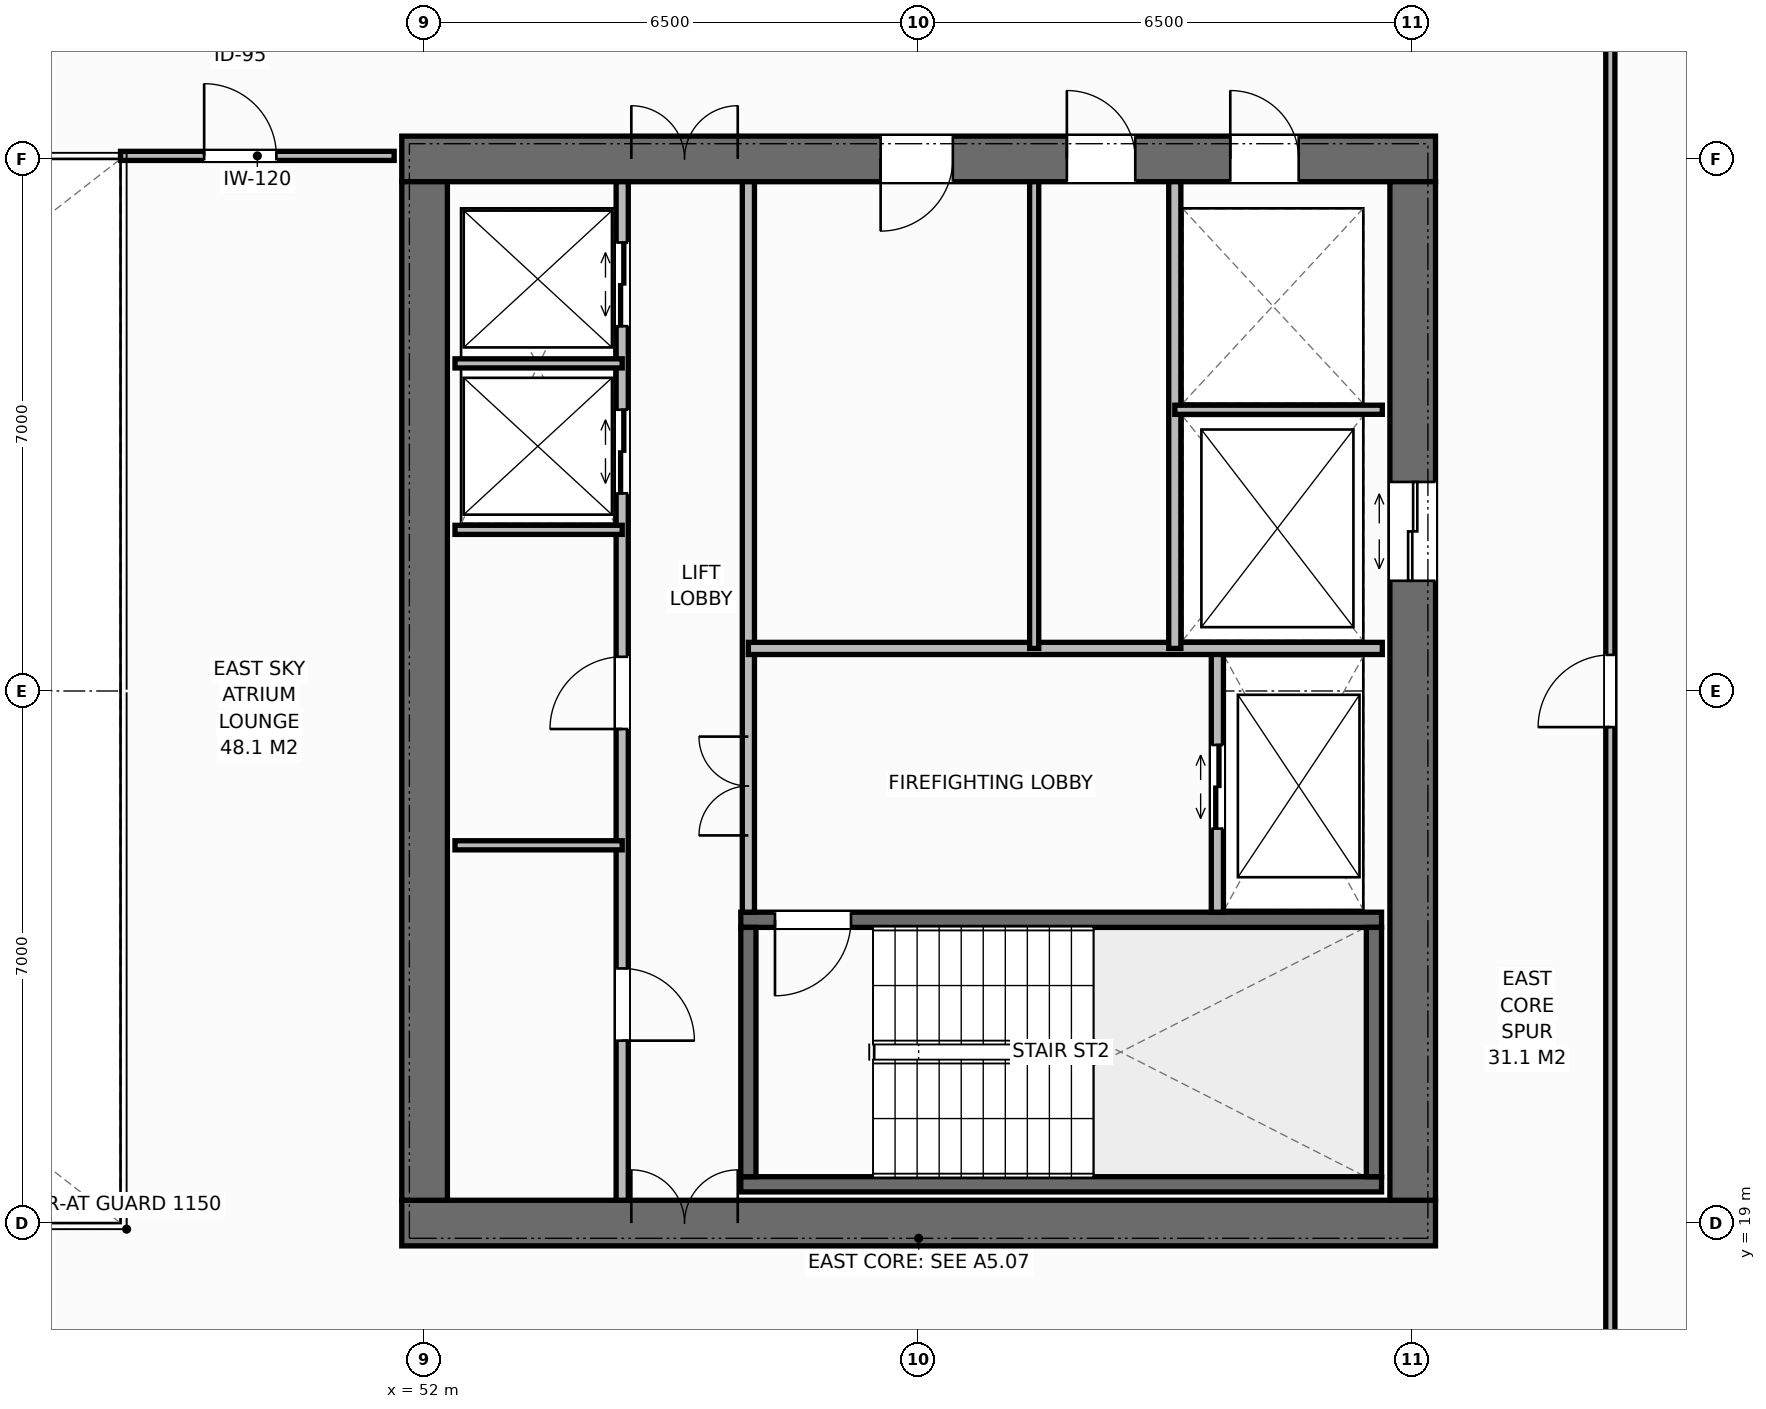
"""IFC4 building model, lengths in metres.
Left out: names, types, materials, properties, quantities, classifications, styles, units other than length and angle.
Written with IfcOpenShell. Run it as: python <this file> out.ifc"""

import sys

from ifc_helpers import new_model, si_unit, direction, frame, frame_2d, origin, place, context, subcontext, project, spatial, rectangle, extrude, element, fill, save


model = new_model("IFC4")
c1 = context("Model", 3, precision=1e-05, world=origin(), true_north=direction((0.0, 1.0)))
c2 = subcontext(c1, "Body", "Model", "MODEL_VIEW")
j1 = project(units=[si_unit("LENGTHUNIT", "METRE"), si_unit("PLANEANGLEUNIT", "RADIAN")], contexts=[c1])
p1 = place(None, origin())
s1 = spatial("IfcSite", under=j1, at=p1, CompositionType="ELEMENT")
p2 = place(p1, origin())
s2 = spatial("IfcBuilding", under=s1, at=p2, CompositionType="ELEMENT")
p3 = place(p2, frame((0.0, 0.0, 151.8)))
s3 = spatial("IfcBuildingStorey", under=s2, at=p3, CompositionType="ELEMENT", Elevation=151.8)
p4 = place(p3, frame((51.7, 19.0, 0.0), z_axis=(0.0, 0.0, 1.0), x_axis=(1.0, 0.0, 0.0)))
e1 = element("IfcWall", 1, at=p4, inside=s3, PredefinedType="SHEAR", context=c2, shape_type="SweptSolid", body=[
    extrude(rectangle(XDim=13.6, YDim=0.6, at=frame_2d((6.8, 0.0))), origin(), (0.0, 0.0, 1.0), 3.8),
])
p5 = place(p4, frame((3.02, 0.0, 0.0)))
e2 = element("IfcOpeningElement", 2, at=p5, cuts=e1, PredefinedType="OPENING", context=c2, shape_type="SweptSolid", body=[
    extrude(rectangle(XDim=1.4, YDim=2.2, at=frame_2d((0.7, 1.1))), frame((0.0, 0.31, 0.0), z_axis=(0.0, -1.0, 0.0), x_axis=(1.0, 0.0, 0.0)), (0.0, 0.0, 1.0), 0.62),
])
p6 = place(p3, frame((51.7, 33.0, 0.0), z_axis=(0.0, 0.0, 1.0), x_axis=(1.0, 0.0, 0.0)))
e3 = element("IfcWall", 3, at=p6, inside=s3, PredefinedType="SHEAR", context=c2, shape_type="SweptSolid", body=[
    extrude(rectangle(XDim=13.6, YDim=0.6, at=frame_2d((6.8, 0.0))), origin(), (0.0, 0.0, 1.0), 3.8),
])
p7 = place(p6, frame((3.02, 0.0, 0.0)))
e4 = element("IfcOpeningElement", 4, at=p7, cuts=e3, PredefinedType="OPENING", context=c2, shape_type="SweptSolid", body=[
    extrude(rectangle(XDim=1.4, YDim=2.2, at=frame_2d((0.7, 1.1))), frame((0.0, 0.31, 0.0), z_axis=(0.0, -1.0, 0.0), x_axis=(1.0, 0.0, 0.0)), (0.0, 0.0, 1.0), 0.62),
])
p8 = place(p6, frame((10.9, 0.0, 0.0)))
e5 = element("IfcOpeningElement", 5, at=p8, cuts=e3, PredefinedType="OPENING", context=c2, shape_type="SweptSolid", body=[
    extrude(rectangle(XDim=0.9, YDim=2.15, at=frame_2d((0.45, 1.075))), frame((0.0, 0.31, 0.0), z_axis=(0.0, -1.0, 0.0), x_axis=(1.0, 0.0, 0.0)), (0.0, 0.0, 1.0), 0.62),
])
p9 = place(p6, frame((6.3, 0.0, 0.0)))
e6 = element("IfcOpeningElement", 6, at=p9, cuts=e3, PredefinedType="OPENING", context=c2, shape_type="SweptSolid", body=[
    extrude(rectangle(XDim=0.95, YDim=2.15, at=frame_2d((0.475, 1.075))), frame((0.0, 0.31, 0.0), z_axis=(0.0, -1.0, 0.0), x_axis=(1.0, 0.0, 0.0)), (0.0, 0.0, 1.0), 0.62),
])
p10 = place(p6, frame((8.75, 0.0, 0.0)))
e7 = element("IfcOpeningElement", 7, at=p10, cuts=e3, PredefinedType="OPENING", context=c2, shape_type="SweptSolid", body=[
    extrude(rectangle(XDim=0.9, YDim=2.15, at=frame_2d((0.45, 1.075))), frame((0.0, 0.31, 0.0), z_axis=(0.0, -1.0, 0.0), x_axis=(1.0, 0.0, 0.0)), (0.0, 0.0, 1.0), 0.62),
])
p11 = place(p3, frame((52.0, 19.3, 0.0), z_axis=(0.0, 0.0, 1.0), x_axis=(0.0, 1.0, 0.0)))
e8 = element("IfcWall", 8, at=p11, inside=s3, PredefinedType="SHEAR", context=c2, shape_type="SweptSolid", body=[
    extrude(rectangle(XDim=13.4, YDim=0.6, at=frame_2d((6.7, 0.0))), origin(), (0.0, 0.0, 1.0), 3.8),
])
p12 = place(p3, frame((65.0, 19.3, 0.0), z_axis=(0.0, 0.0, 1.0), x_axis=(0.0, 1.0, 0.0)))
e9 = element("IfcWall", 9, at=p12, inside=s3, PredefinedType="SHEAR", context=c2, shape_type="SweptSolid", body=[
    extrude(rectangle(XDim=13.4, YDim=0.6, at=frame_2d((6.7, 0.0))), origin(), (0.0, 0.0, 1.0), 3.8),
])
p13 = place(p12, frame((8.15, 0.0, 0.0)))
e10 = element("IfcOpeningElement", 10, at=p13, cuts=e9, PredefinedType="OPENING", context=c2, shape_type="SweptSolid", body=[
    extrude(rectangle(XDim=1.3, YDim=2.2, at=frame_2d((0.65, 1.1))), frame((0.0, 0.31, 0.0), z_axis=(0.0, -1.0, 0.0), x_axis=(1.0, 0.0, 0.0)), (0.0, 0.0, 1.0), 0.62),
])
p14 = place(p3, frame((56.16, 19.51, 0.0), z_axis=(0.0, 0.0, 1.0), x_axis=(1.0, 0.0, 0.0)))
e11 = element("IfcWall", 11, at=p14, inside=s3, PredefinedType="SHEAR", context=c2, shape_type="SweptSolid", body=[
    extrude(rectangle(XDim=8.43, YDim=0.2, at=frame_2d((4.215, 0.0))), origin(), (0.0, 0.0, 1.0), 3.8),
])
p15 = place(p3, frame((56.16, 22.99, 0.0), z_axis=(0.0, 0.0, 1.0), x_axis=(1.0, 0.0, 0.0)))
e12 = element("IfcWall", 12, at=p15, inside=s3, PredefinedType="SHEAR", context=c2, shape_type="SweptSolid", body=[
    extrude(rectangle(XDim=8.43, YDim=0.2, at=frame_2d((4.215, 0.0))), origin(), (0.0, 0.0, 1.0), 3.8),
])
p16 = place(p15, frame((0.45, 0.0, 0.0)))
e13 = element("IfcOpeningElement", 13, at=p16, cuts=e12, PredefinedType="OPENING", context=c2, shape_type="SweptSolid", body=[
    extrude(rectangle(XDim=1.0, YDim=2.15, at=frame_2d((0.5, 1.075))), frame((0.0, 0.11, 0.0), z_axis=(0.0, -1.0, 0.0), x_axis=(1.0, 0.0, 0.0)), (0.0, 0.0, 1.0), 0.22),
])
for number, where, z_axis, x_axis in (
    (14, (56.26, 19.61, 0.0), (0.0, 0.0, 1.0), (0.0, 1.0, 0.0)),
    (15, (64.49, 19.61, 0.0), (0.0, 0.0, 1.0), (0.0, 1.0, 0.0)),
):
    element("IfcWall", number, at=place(p3, frame(where, z_axis=z_axis, x_axis=x_axis)), inside=s3, PredefinedType="SHEAR", context=c2, shape_type="SweptSolid", body=[
        extrude(rectangle(XDim=3.28, YDim=0.2, at=frame_2d((1.64, 0.0))), origin(), (0.0, 0.0, 1.0), 3.8),
    ])
p17 = place(p3, frame((54.6, 19.3, 0.0), z_axis=(0.0, 0.0, 1.0), x_axis=(0.0, 1.0, 0.0)))
e16 = element("IfcWall", 16, at=p17, inside=s3, PredefinedType="STANDARD", context=c2, shape_type="SweptSolid", body=[
    extrude(rectangle(XDim=13.4, YDim=0.16, at=frame_2d((6.7, 0.0))), origin(), (0.0, 0.0, 1.0), 3.572),
])
p18 = place(p17, frame((2.1, 0.0, 0.0)))
e17 = element("IfcOpeningElement", 17, at=p18, cuts=e16, PredefinedType="OPENING", context=c2, shape_type="SweptSolid", body=[
    extrude(rectangle(XDim=0.95, YDim=2.15, at=frame_2d((0.475, 1.075))), frame((0.0, 0.09, 0.0), z_axis=(0.0, -1.0, 0.0), x_axis=(1.0, 0.0, 0.0)), (0.0, 0.0, 1.0), 0.18),
])
p19 = place(p17, frame((6.2, 0.0, 0.0)))
e18 = element("IfcOpeningElement", 18, at=p19, cuts=e16, PredefinedType="OPENING", context=c2, shape_type="SweptSolid", body=[
    extrude(rectangle(XDim=0.95, YDim=2.15, at=frame_2d((0.475, 1.075))), frame((0.0, 0.09, 0.0), z_axis=(0.0, -1.0, 0.0), x_axis=(1.0, 0.0, 0.0)), (0.0, 0.0, 1.0), 0.18),
])
p20 = place(p17, frame((9.3, 0.0, 0.0)))
e19 = element("IfcOpeningElement", 19, at=p20, cuts=e16, PredefinedType="OPENING", context=c2, shape_type="SweptSolid", body=[
    extrude(rectangle(XDim=1.1, YDim=2.2, at=frame_2d((0.55, 1.1))), frame((0.0, 0.09, 0.0), z_axis=(0.0, -1.0, 0.0), x_axis=(1.0, 0.0, 0.0)), (0.0, 0.0, 1.0), 0.18),
])
p21 = place(p17, frame((11.5, 0.0, 0.0)))
e20 = element("IfcOpeningElement", 20, at=p21, cuts=e16, PredefinedType="OPENING", context=c2, shape_type="SweptSolid", body=[
    extrude(rectangle(XDim=1.1, YDim=2.2, at=frame_2d((0.55, 1.1))), frame((0.0, 0.09, 0.0), z_axis=(0.0, -1.0, 0.0), x_axis=(1.0, 0.0, 0.0)), (0.0, 0.0, 1.0), 0.18),
])
p22 = place(p3, frame((56.26, 23.09, 0.0), z_axis=(0.0, 0.0, 1.0), x_axis=(0.0, 1.0, 0.0)))
e21 = element("IfcWall", 21, at=p22, inside=s3, PredefinedType="STANDARD", context=c2, shape_type="SweptSolid", body=[
    extrude(rectangle(XDim=9.61, YDim=0.16, at=frame_2d((4.805, 0.0))), origin(), (0.0, 0.0, 1.0), 3.572),
])
p23 = place(p22, frame((1.01, 0.0, 0.0)))
e22 = element("IfcOpeningElement", 22, at=p23, cuts=e21, PredefinedType="OPENING", context=c2, shape_type="SweptSolid", body=[
    extrude(rectangle(XDim=1.3, YDim=2.2, at=frame_2d((0.65, 1.1))), frame((0.0, 0.09, 0.0), z_axis=(0.0, -1.0, 0.0), x_axis=(1.0, 0.0, 0.0)), (0.0, 0.0, 1.0), 0.18),
])
for number, where, z_axis, x_axis in (
    (23, (52.4, 23.97, 0.0), (0.0, 0.0, 1.0), (1.0, 0.0, 0.0)),
    (24, (52.4, 28.12, 0.0), (0.0, 0.0, 1.0), (1.0, 0.0, 0.0)),
    (25, (52.4, 30.31, 0.0), (0.0, 0.0, 1.0), (1.0, 0.0, 0.0)),
):
    element("IfcWall", number, at=place(p3, frame(where, z_axis=z_axis, x_axis=x_axis)), inside=s3, PredefinedType="PARTITIONING", context=c2, shape_type="SweptSolid", body=[
        extrude(rectangle(XDim=2.2, YDim=0.12, at=frame_2d((1.1, 0.0))), origin(), (0.0, 0.0, 1.0), 3.572),
    ])
p24 = place(p3, frame((62.43, 23.09, 0.0), z_axis=(0.0, 0.0, 1.0), x_axis=(0.0, 1.0, 0.0)))
e26 = element("IfcWall", 26, at=p24, inside=s3, PredefinedType="STANDARD", context=c2, shape_type="SweptSolid", body=[
    extrude(rectangle(XDim=3.47, YDim=0.16, at=frame_2d((1.735, 0.0))), origin(), (0.0, 0.0, 1.0), 3.572),
])
p25 = place(p24, frame((1.1, 0.0, 0.0)))
e27 = element("IfcOpeningElement", 27, at=p25, cuts=e26, PredefinedType="OPENING", context=c2, shape_type="SweptSolid", body=[
    extrude(rectangle(XDim=1.1, YDim=2.2, at=frame_2d((0.55, 1.1))), frame((0.0, 0.09, 0.0), z_axis=(0.0, -1.0, 0.0), x_axis=(1.0, 0.0, 0.0)), (0.0, 0.0, 1.0), 0.18),
])
p26 = place(p3, frame((56.26, 26.56, 0.0), z_axis=(0.0, 0.0, 1.0), x_axis=(1.0, 0.0, 0.0)))
e28 = element("IfcWall", 28, at=p26, inside=s3, PredefinedType="STANDARD", context=c2, shape_type="SweptSolid", body=[
    extrude(rectangle(XDim=8.34, YDim=0.16, at=frame_2d((4.17, 0.0))), origin(), (0.0, 0.0, 1.0), 3.572),
])
p27 = place(p3, frame((61.87, 26.56, 0.0), z_axis=(0.0, 0.0, 1.0), x_axis=(0.0, 1.0, 0.0)))
e29 = element("IfcWall", 29, at=p27, inside=s3, PredefinedType="STANDARD", context=c2, shape_type="SweptSolid", body=[
    extrude(rectangle(XDim=6.14, YDim=0.16, at=frame_2d((3.07, 0.0))), origin(), (0.0, 0.0, 1.0), 3.572),
])
p28 = place(p3, frame((61.87, 29.7, 0.0), z_axis=(0.0, 0.0, 1.0), x_axis=(1.0, 0.0, 0.0)))
e30 = element("IfcWall", 30, at=p28, inside=s3, PredefinedType="PARTITIONING", context=c2, shape_type="SweptSolid", body=[
    extrude(rectangle(XDim=2.73, YDim=0.12, at=frame_2d((1.365, 0.0))), origin(), (0.0, 0.0, 1.0), 3.572),
])
p29 = place(p3, frame((60.02, 26.56, 0.0), z_axis=(0.0, 0.0, 1.0), x_axis=(0.0, 1.0, 0.0)))
e31 = element("IfcWall", 31, at=p29, inside=s3, PredefinedType="PARTITIONING", context=c2, shape_type="SweptSolid", body=[
    extrude(rectangle(XDim=6.14, YDim=0.12, at=frame_2d((3.07, 0.0))), origin(), (0.0, 0.0, 1.0), 3.572),
])
p30 = place(p3, frame((48.0, 33.04, 0.0), z_axis=(0.0, 0.0, 1.0), x_axis=(1.0, 0.0, 0.0)))
e32 = element("IfcWall", 32, at=p30, inside=s3, PredefinedType="PARTITIONING", context=c2, shape_type="SweptSolid", body=[
    extrude(rectangle(XDim=3.6, YDim=0.12, at=frame_2d((1.8, 0.0))), origin(), (0.0, 0.0, 1.0), 3.312),
])
p31 = place(p30, frame((1.1, 0.0, 0.0)))
e33 = element("IfcOpeningElement", 33, at=p31, cuts=e32, PredefinedType="OPENING", context=c2, shape_type="SweptSolid", body=[
    extrude(rectangle(XDim=0.95, YDim=2.15, at=frame_2d((0.475, 1.075))), frame((0.0, 0.07, 0.0), z_axis=(0.0, -1.0, 0.0), x_axis=(1.0, 0.0, 0.0)), (0.0, 0.0, 1.0), 0.14),
])
p32 = place(p3, frame((67.6, 16.5, 0.0), z_axis=(0.0, 0.0, 1.0), x_axis=(0.0, 1.0, 0.0)))
e34 = element("IfcWall", 34, at=p32, inside=s3, PredefinedType="PARTITIONING", context=c2, shape_type="SweptSolid", body=[
    extrude(rectangle(XDim=19.0, YDim=0.12, at=frame_2d((9.5, 0.0))), origin(), (0.0, 0.0, 1.0), 3.572),
])
p33 = place(p32, frame((9.025, 0.0, 0.0)))
e35 = element("IfcOpeningElement", 35, at=p33, cuts=e34, PredefinedType="OPENING", context=c2, shape_type="SweptSolid", body=[
    extrude(rectangle(XDim=0.95, YDim=2.15, at=frame_2d((0.475, 1.075))), frame((0.0, 0.07, 0.0), z_axis=(0.0, -1.0, 0.0), x_axis=(1.0, 0.0, 0.0)), (0.0, 0.0, 1.0), 0.14),
])
p34 = place(p5, origin())
e36 = element("IfcDoor", 36, at=p34, inside=s3, OperationType="DOUBLE_DOOR_SINGLE_SWING", PredefinedType="DOOR", context=c2, shape_type="SweptSolid", body=[
    extrude(rectangle(XDim=1.4, YDim=2.2, at=frame_2d((0.7, 1.1))), frame((0.0, 0.075, 0.0), z_axis=(0.0, -1.0, 0.0), x_axis=(1.0, 0.0, 0.0)), (0.0, 0.0, 1.0), 0.05),
])
fill(e2, e36)
p35 = place(p7, origin())
e37 = element("IfcDoor", 37, at=p35, inside=s3, OperationType="DOUBLE_DOOR_SINGLE_SWING", PredefinedType="DOOR", context=c2, shape_type="SweptSolid", body=[
    extrude(rectangle(XDim=1.4, YDim=2.2, at=frame_2d((0.7, 1.1))), frame((0.0, -0.025, 0.0), z_axis=(0.0, -1.0, 0.0), x_axis=(1.0, 0.0, 0.0)), (0.0, 0.0, 1.0), 0.05),
])
fill(e4, e37)
p36 = place(p18, origin())
e38 = element("IfcDoor", 38, at=p36, inside=s3, OperationType="SINGLE_SWING_RIGHT", PredefinedType="DOOR", context=c2, shape_type="SweptSolid", body=[
    extrude(rectangle(XDim=0.95, YDim=2.15, at=frame_2d((0.475, 1.075))), frame((0.0, 0.025, 0.0), z_axis=(0.0, -1.0, 0.0), x_axis=(1.0, 0.0, 0.0)), (0.0, 0.0, 1.0), 0.05),
])
fill(e17, e38)
p37 = place(p19, origin())
e39 = element("IfcDoor", 39, at=p37, inside=s3, OperationType="SINGLE_SWING_LEFT", PredefinedType="DOOR", context=c2, shape_type="SweptSolid", body=[
    extrude(rectangle(XDim=0.95, YDim=2.15, at=frame_2d((0.475, 1.075))), frame((0.0, 0.025, 0.0), z_axis=(0.0, -1.0, 0.0), x_axis=(1.0, 0.0, 0.0)), (0.0, 0.0, 1.0), 0.05),
])
fill(e18, e39)
p38 = place(p20, origin())
e40 = element("IfcDoor", 40, at=p38, inside=s3, OperationType="DOUBLE_DOOR_SLIDING", PredefinedType="DOOR", context=c2, shape_type="SweptSolid", body=[
    extrude(rectangle(XDim=1.1, YDim=2.2, at=frame_2d((0.55, 1.1))), frame((0.0, 0.025, 0.0), z_axis=(0.0, -1.0, 0.0), x_axis=(1.0, 0.0, 0.0)), (0.0, 0.0, 1.0), 0.05),
])
fill(e19, e40)
p39 = place(p21, origin())
e41 = element("IfcDoor", 41, at=p39, inside=s3, OperationType="DOUBLE_DOOR_SLIDING", PredefinedType="DOOR", context=c2, shape_type="SweptSolid", body=[
    extrude(rectangle(XDim=1.1, YDim=2.2, at=frame_2d((0.55, 1.1))), frame((0.0, 0.025, 0.0), z_axis=(0.0, -1.0, 0.0), x_axis=(1.0, 0.0, 0.0)), (0.0, 0.0, 1.0), 0.05),
])
fill(e20, e41)
p40 = place(p16, origin())
e42 = element("IfcDoor", 42, at=p40, inside=s3, OperationType="SINGLE_SWING_RIGHT", PredefinedType="DOOR", context=c2, shape_type="SweptSolid", body=[
    extrude(rectangle(XDim=1.0, YDim=2.15, at=frame_2d((0.5, 1.075))), frame((0.0, 0.025, 0.0), z_axis=(0.0, -1.0, 0.0), x_axis=(1.0, 0.0, 0.0)), (0.0, 0.0, 1.0), 0.05),
])
fill(e13, e42)
p41 = place(p25, origin())
e43 = element("IfcDoor", 43, at=p41, inside=s3, OperationType="DOUBLE_DOOR_SLIDING", PredefinedType="DOOR", context=c2, shape_type="SweptSolid", body=[
    extrude(rectangle(XDim=1.1, YDim=2.2, at=frame_2d((0.55, 1.1))), frame((0.0, 0.025, 0.0), z_axis=(0.0, -1.0, 0.0), x_axis=(1.0, 0.0, 0.0)), (0.0, 0.0, 1.0), 0.05),
])
fill(e27, e43)
p42 = place(p23, origin())
e44 = element("IfcDoor", 44, at=p42, inside=s3, OperationType="DOUBLE_DOOR_SINGLE_SWING", PredefinedType="DOOR", context=c2, shape_type="SweptSolid", body=[
    extrude(rectangle(XDim=1.3, YDim=2.2, at=frame_2d((0.65, 1.1))), frame((0.0, 0.025, 0.0), z_axis=(0.0, -1.0, 0.0), x_axis=(1.0, 0.0, 0.0)), (0.0, 0.0, 1.0), 0.05),
])
fill(e22, e44)
p43 = place(p13, origin())
e45 = element("IfcDoor", 45, at=p43, inside=s3, OperationType="DOUBLE_DOOR_SLIDING", PredefinedType="DOOR", context=c2, shape_type="SweptSolid", body=[
    extrude(rectangle(XDim=1.3, YDim=2.2, at=frame_2d((0.65, 1.1))), frame((0.0, 0.025, 0.0), z_axis=(0.0, -1.0, 0.0), x_axis=(1.0, 0.0, 0.0)), (0.0, 0.0, 1.0), 0.05),
])
fill(e10, e45)
p44 = place(p8, origin())
e46 = element("IfcDoor", 46, at=p44, inside=s3, OperationType="SINGLE_SWING_LEFT", PredefinedType="DOOR", context=c2, shape_type="SweptSolid", body=[
    extrude(rectangle(XDim=0.9, YDim=2.15, at=frame_2d((0.45, 1.075))), frame((0.0, -0.025, 0.0), z_axis=(0.0, -1.0, 0.0), x_axis=(1.0, 0.0, 0.0)), (0.0, 0.0, 1.0), 0.05),
])
fill(e5, e46)
p45 = place(p9, origin())
e47 = element("IfcDoor", 47, at=p45, inside=s3, OperationType="SINGLE_SWING_RIGHT", PredefinedType="DOOR", context=c2, shape_type="SweptSolid", body=[
    extrude(rectangle(XDim=0.95, YDim=2.15, at=frame_2d((0.475, 1.075))), frame((0.0, -0.025, 0.0), z_axis=(0.0, -1.0, 0.0), x_axis=(1.0, 0.0, 0.0)), (0.0, 0.0, 1.0), 0.05),
])
fill(e6, e47)
p46 = place(p10, origin())
e48 = element("IfcDoor", 48, at=p46, inside=s3, OperationType="SINGLE_SWING_LEFT", PredefinedType="DOOR", context=c2, shape_type="SweptSolid", body=[
    extrude(rectangle(XDim=0.9, YDim=2.15, at=frame_2d((0.45, 1.075))), frame((0.0, -0.025, 0.0), z_axis=(0.0, -1.0, 0.0), x_axis=(1.0, 0.0, 0.0)), (0.0, 0.0, 1.0), 0.05),
])
fill(e7, e48)
p47 = place(p31, origin())
e49 = element("IfcDoor", 49, at=p47, inside=s3, OperationType="SINGLE_SWING_LEFT", PredefinedType="DOOR", context=c2, shape_type="SweptSolid", body=[
    extrude(rectangle(XDim=0.95, YDim=2.15, at=frame_2d((0.475, 1.075))), frame((0.0, 0.025, 0.0), z_axis=(0.0, -1.0, 0.0), x_axis=(1.0, 0.0, 0.0)), (0.0, 0.0, 1.0), 0.05),
])
fill(e33, e49)
p48 = place(p33, origin())
e50 = element("IfcDoor", 50, at=p48, inside=s3, OperationType="SINGLE_SWING_LEFT", PredefinedType="DOOR", context=c2, shape_type="SweptSolid", body=[
    extrude(rectangle(XDim=0.95, YDim=2.15, at=frame_2d((0.475, 1.075))), frame((0.0, 0.025, 0.0), z_axis=(0.0, -1.0, 0.0), x_axis=(1.0, 0.0, 0.0)), (0.0, 0.0, 1.0), 0.05),
])
fill(e35, e50)
save(model, sys.argv[1])
